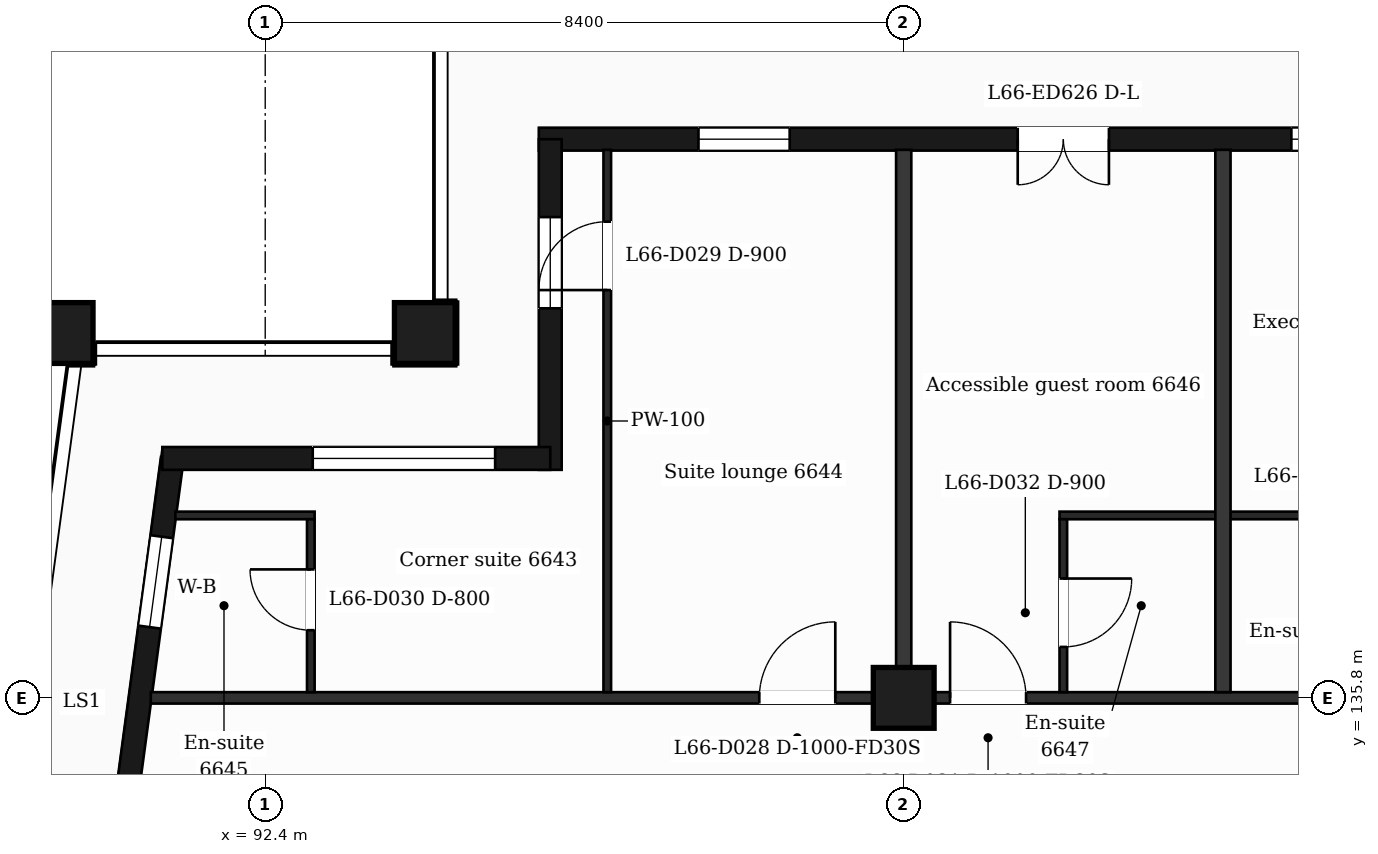
"""IFC4 building model, lengths in metres.
Left out: names, types, materials, properties, quantities, classifications, styles, units other than length and angle.
Written with IfcOpenShell. Run it as: python <this file> out.ifc"""

import sys

from ifc_helpers import new_model, si_unit, direction, frame, frame_2d, origin, origin_2d, place, context, subcontext, project, spatial, rectangle, extrude, element, fill, save


model = new_model("IFC4")
c1 = context("Model", 3, precision=1e-05, world=origin(), true_north=direction((0.0, 1.0)))
c2 = subcontext(c1, "Body", "Model", "MODEL_VIEW")
j1 = project(units=[si_unit("LENGTHUNIT", "METRE"), si_unit("PLANEANGLEUNIT", "RADIAN")], contexts=[c1])
p1 = place(None, origin())
s1 = spatial("IfcSite", under=j1, at=p1, CompositionType="ELEMENT")
p2 = place(p1, origin())
s2 = spatial("IfcBuilding", under=s1, at=p2, CompositionType="ELEMENT")
p3 = place(p2, frame((0.0, 0.0, 273.8)))
s3 = spatial("IfcBuildingStorey", under=s2, at=p3, CompositionType="ELEMENT", Elevation=273.8)
for number, where, z_axis, x_axis in (
    (1, (94.5, 140.6, 0.0), (0.0, 0.0, 1.0), (1.0, 0.0, 0.0)),
    (2, (89.735, 140.6, 0.0), (0.0, 0.0, 1.0), (1.0, 0.0, 0.0)),
    (3, (100.8, 135.8, 0.0), (0.0, 0.0, 1.0), (1.0, 0.0, 0.0)),
):
    element("IfcColumn", number, at=place(p3, frame(where, z_axis=z_axis, x_axis=x_axis)), inside=s3, PredefinedType="COLUMN", context=c2, shape_type="SweptSolid", body=[
        extrude(rectangle(XDim=0.8, YDim=0.8, at=origin_2d()), origin(), (0.0, 0.0, 1.0), 3.7),
    ])
p4 = place(p3, frame((91.177, 138.95, 0.0), z_axis=(0.0, 0.0, 1.0), x_axis=(-0.133426664613, -0.991058689065, 0.0)))
e4 = element("IfcWall", 4, at=p4, inside=s3, PredefinedType="SOLIDWALL", context=c2, shape_type="SweptSolid", body=[
    extrude(rectangle(XDim=6.609, YDim=0.3, at=frame_2d((3.305, 0.0))), origin(), (0.0, 0.0, 1.0), 3.38),
])
p5 = place(p4, frame((1.039, 0.0, 0.9)))
e5 = element("IfcOpeningElement", 5, at=p5, cuts=e4, PredefinedType="OPENING", context=c2, shape_type="SweptSolid", body=[
    extrude(rectangle(XDim=1.2, YDim=2.1, at=frame_2d((0.6, 1.05))), frame((0.0, 0.16, 0.0), z_axis=(0.0, -1.0, 0.0), x_axis=(1.0, 0.0, 0.0)), (0.0, 0.0, 1.0), 0.32),
])
p6 = place(p4, frame((4.294, 0.0, 0.0)))
e6 = element("IfcOpeningElement", 6, at=p6, cuts=e4, PredefinedType="OPENING", context=c2, shape_type="SweptSolid", body=[
    extrude(rectangle(XDim=1.2, YDim=2.4, at=frame_2d((0.6, 1.2))), frame((0.0, 0.16, 0.0), z_axis=(0.0, -1.0, 0.0), x_axis=(1.0, 0.0, 0.0)), (0.0, 0.0, 1.0), 0.32),
])
p7 = place(p3, frame((110.4, 143.15, 0.0), z_axis=(0.0, 0.0, 1.0), x_axis=(-1.0, 0.0, 0.0)))
e7 = element("IfcWall", 7, at=p7, inside=s3, PredefinedType="SOLIDWALL", context=c2, shape_type="SweptSolid", body=[
    extrude(rectangle(XDim=14.4, YDim=0.3, at=frame_2d((7.2, 0.0))), origin(), (0.0, 0.0, 1.0), 3.38),
])
p8 = place(p7, frame((2.1, 0.0, 0.9)))
e8 = element("IfcOpeningElement", 8, at=p8, cuts=e7, PredefinedType="OPENING", context=c2, shape_type="SweptSolid", body=[
    extrude(rectangle(XDim=2.4, YDim=2.1, at=frame_2d((1.2, 1.05))), frame((0.0, 0.16, 0.0), z_axis=(0.0, -1.0, 0.0), x_axis=(1.0, 0.0, 0.0)), (0.0, 0.0, 1.0), 0.32),
])
p9 = place(p7, frame((6.9, 0.0, 0.0)))
e9 = element("IfcOpeningElement", 9, at=p9, cuts=e7, PredefinedType="OPENING", context=c2, shape_type="SweptSolid", body=[
    extrude(rectangle(XDim=1.2, YDim=2.4, at=frame_2d((0.6, 1.2))), frame((0.0, 0.16, 0.0), z_axis=(0.0, -1.0, 0.0), x_axis=(1.0, 0.0, 0.0)), (0.0, 0.0, 1.0), 0.32),
])
p10 = place(p7, frame((11.1, 0.0, 0.9)))
e10 = element("IfcOpeningElement", 10, at=p10, cuts=e7, PredefinedType="OPENING", context=c2, shape_type="SweptSolid", body=[
    extrude(rectangle(XDim=1.2, YDim=2.1, at=frame_2d((0.6, 1.05))), frame((0.0, 0.16, 0.0), z_axis=(0.0, -1.0, 0.0), x_axis=(1.0, 0.0, 0.0)), (0.0, 0.0, 1.0), 0.32),
])
p11 = place(p3, frame((96.15, 143.15, 0.0), z_axis=(0.0, 0.0, 1.0), x_axis=(0.0, -1.0, 0.0)))
e11 = element("IfcWall", 11, at=p11, inside=s3, PredefinedType="SOLIDWALL", context=c2, shape_type="SweptSolid", body=[
    extrude(rectangle(XDim=4.35, YDim=0.3, at=frame_2d((2.175, 0.0))), origin(), (0.0, 0.0, 1.0), 3.38),
])
p12 = place(p11, frame((1.025, 0.0, 0.9)))
e12 = element("IfcOpeningElement", 12, at=p12, cuts=e11, PredefinedType="OPENING", context=c2, shape_type="SweptSolid", body=[
    extrude(rectangle(XDim=1.2, YDim=2.1, at=frame_2d((0.6, 1.05))), frame((0.0, 0.16, 0.0), z_axis=(0.0, -1.0, 0.0), x_axis=(1.0, 0.0, 0.0)), (0.0, 0.0, 1.0), 0.32),
])
p13 = place(p3, frame((96.15, 138.95, 0.0), z_axis=(0.0, 0.0, 1.0), x_axis=(-1.0, 0.0, 0.0)))
e13 = element("IfcWall", 13, at=p13, inside=s3, PredefinedType="SOLIDWALL", context=c2, shape_type="SweptSolid", body=[
    extrude(rectangle(XDim=5.104, YDim=0.3, at=frame_2d((2.552, 0.0))), origin(), (0.0, 0.0, 1.0), 3.38),
])
p14 = place(p13, frame((0.725, 0.0, 0.9)))
e14 = element("IfcOpeningElement", 14, at=p14, cuts=e13, PredefinedType="OPENING", context=c2, shape_type="SweptSolid", body=[
    extrude(rectangle(XDim=2.4, YDim=2.1, at=frame_2d((1.2, 1.05))), frame((0.0, 0.16, 0.0), z_axis=(0.0, -1.0, 0.0), x_axis=(1.0, 0.0, 0.0)), (0.0, 0.0, 1.0), 0.32),
])
p15 = place(p3, frame((90.895, 135.8, 0.0), z_axis=(0.0, 0.0, 1.0), x_axis=(1.0, 0.0, 0.0)))
e15 = element("IfcWall", 15, at=p15, inside=s3, PredefinedType="PARTITIONING", context=c2, shape_type="SweptSolid", body=[
    extrude(rectangle(XDim=45.011, YDim=0.15, at=frame_2d((22.505, 0.0))), origin(), (0.0, 0.0, 1.0), 3.38),
])
p16 = place(p15, frame((8.005, 0.0, 0.0)))
e16 = element("IfcOpeningElement", 16, at=p16, cuts=e15, PredefinedType="OPENING", context=c2, shape_type="SweptSolid", body=[
    extrude(rectangle(XDim=1.0, YDim=2.1, at=frame_2d((0.5, 1.05))), frame((0.0, 0.085, 0.0), z_axis=(0.0, -1.0, 0.0), x_axis=(1.0, 0.0, 0.0)), (0.0, 0.0, 1.0), 0.17),
])
p17 = place(p15, frame((10.515, 0.0, 0.0)))
e17 = element("IfcOpeningElement", 17, at=p17, cuts=e15, PredefinedType="OPENING", context=c2, shape_type="SweptSolid", body=[
    extrude(rectangle(XDim=1.0, YDim=2.1, at=frame_2d((0.5, 1.05))), frame((0.0, 0.085, 0.0), z_axis=(0.0, -1.0, 0.0), x_axis=(1.0, 0.0, 0.0)), (0.0, 0.0, 1.0), 0.17),
])
p18 = place(p15, frame((20.156, 0.0, 0.0)))
e18 = element("IfcOpeningElement", 18, at=p18, cuts=e15, PredefinedType="OPENING", context=c2, shape_type="SweptSolid", body=[
    extrude(rectangle(XDim=1.0, YDim=2.1, at=frame_2d((0.5, 1.05))), frame((0.0, 0.085, 0.0), z_axis=(0.0, -1.0, 0.0), x_axis=(1.0, 0.0, 0.0)), (0.0, 0.0, 1.0), 0.17),
])
p19 = place(p15, frame((24.13, 0.0, 0.0)))
e19 = element("IfcOpeningElement", 19, at=p19, cuts=e15, PredefinedType="OPENING", context=c2, shape_type="SweptSolid", body=[
    extrude(rectangle(XDim=0.95, YDim=2.1, at=frame_2d((0.475, 1.05))), frame((0.0, 0.085, 0.0), z_axis=(0.0, -1.0, 0.0), x_axis=(1.0, 0.0, 0.0)), (0.0, 0.0, 1.0), 0.17),
])
p20 = place(p15, frame((29.492, 0.0, 0.0)))
e20 = element("IfcOpeningElement", 20, at=p20, cuts=e15, PredefinedType="OPENING", context=c2, shape_type="SweptSolid", body=[
    extrude(rectangle(XDim=0.95, YDim=2.1, at=frame_2d((0.475, 1.05))), frame((0.0, 0.085, 0.0), z_axis=(0.0, -1.0, 0.0), x_axis=(1.0, 0.0, 0.0)), (0.0, 0.0, 1.0), 0.17),
])
p21 = place(p15, frame((31.705, 0.0, 0.0)))
e21 = element("IfcOpeningElement", 21, at=p21, cuts=e15, PredefinedType="OPENING", context=c2, shape_type="SweptSolid", body=[
    extrude(rectangle(XDim=0.95, YDim=2.1, at=frame_2d((0.475, 1.05))), frame((0.0, 0.085, 0.0), z_axis=(0.0, -1.0, 0.0), x_axis=(1.0, 0.0, 0.0)), (0.0, 0.0, 1.0), 0.17),
])
p22 = place(p15, frame((39.814, 0.0, 0.0)))
e22 = element("IfcOpeningElement", 22, at=p22, cuts=e15, PredefinedType="OPENING", context=c2, shape_type="SweptSolid", body=[
    extrude(rectangle(XDim=0.95, YDim=2.1, at=frame_2d((0.475, 1.05))), frame((0.0, 0.085, 0.0), z_axis=(0.0, -1.0, 0.0), x_axis=(1.0, 0.0, 0.0)), (0.0, 0.0, 1.0), 0.17),
])
p23 = place(p3, frame((91.218, 138.2, 0.0), z_axis=(0.0, 0.0, 1.0), x_axis=(1.0, 0.0, 0.0)))
e23 = element("IfcWall", 23, at=p23, inside=s3, PredefinedType="PARTITIONING", context=c2, shape_type="SweptSolid", body=[
    extrude(rectangle(XDim=1.832, YDim=0.1, at=frame_2d((0.916, 0.0))), origin(), (0.0, 0.0, 1.0), 3.38),
])
p24 = place(p3, frame((102.85, 138.2, 0.0), z_axis=(0.0, 0.0, 1.0), x_axis=(1.0, 0.0, 0.0)))
e24 = element("IfcWall", 24, at=p24, inside=s3, PredefinedType="PARTITIONING", context=c2, shape_type="SweptSolid", body=[
    extrude(rectangle(XDim=4.9, YDim=0.1, at=frame_2d((2.45, 0.0))), origin(), (0.0, 0.0, 1.0), 3.38),
])
p25 = place(p24, frame((3.22, 0.0, 0.0)))
e25 = element("IfcOpeningElement", 25, at=p25, cuts=e24, PredefinedType="OPENING", context=c2, shape_type="SweptSolid", body=[
    extrude(rectangle(XDim=0.8, YDim=2.1, at=frame_2d((0.4, 1.05))), frame((0.0, 0.06, 0.0), z_axis=(0.0, -1.0, 0.0), x_axis=(1.0, 0.0, 0.0)), (0.0, 0.0, 1.0), 0.12),
])
p26 = place(p3, frame((93.0, 135.875, 0.0), z_axis=(0.0, 0.0, 1.0), x_axis=(0.0, 1.0, 0.0)))
e26 = element("IfcWall", 26, at=p26, inside=s3, PredefinedType="PARTITIONING", context=c2, shape_type="SweptSolid", body=[
    extrude(rectangle(XDim=2.275, YDim=0.1, at=frame_2d((1.137, 0.0))), origin(), (0.0, 0.0, 1.0), 3.38),
])
p27 = place(p26, frame((0.815, 0.0, 0.0)))
e27 = element("IfcOpeningElement", 27, at=p27, cuts=e26, PredefinedType="OPENING", context=c2, shape_type="SweptSolid", body=[
    extrude(rectangle(XDim=0.8, YDim=2.1, at=frame_2d((0.4, 1.05))), frame((0.0, 0.06, 0.0), z_axis=(0.0, -1.0, 0.0), x_axis=(1.0, 0.0, 0.0)), (0.0, 0.0, 1.0), 0.12),
])
p28 = place(p3, frame((96.9, 135.875, 0.0), z_axis=(0.0, 0.0, 1.0), x_axis=(0.0, 1.0, 0.0)))
e28 = element("IfcWall", 28, at=p28, inside=s3, PredefinedType="PARTITIONING", context=c2, shape_type="SweptSolid", body=[
    extrude(rectangle(XDim=7.135, YDim=0.1, at=frame_2d((3.567, 0.0))), origin(), (0.0, 0.0, 1.0), 3.38),
])
p29 = place(p28, frame((5.29, 0.0, 0.0)))
e29 = element("IfcOpeningElement", 29, at=p29, cuts=e28, PredefinedType="OPENING", context=c2, shape_type="SweptSolid", body=[
    extrude(rectangle(XDim=0.9, YDim=2.1, at=frame_2d((0.45, 1.05))), frame((0.0, 0.06, 0.0), z_axis=(0.0, -1.0, 0.0), x_axis=(1.0, 0.0, 0.0)), (0.0, 0.0, 1.0), 0.12),
])
p30 = place(p3, frame((100.8, 135.875, 0.0), z_axis=(0.0, 0.0, 1.0), x_axis=(0.0, 1.0, 0.0)))
e30 = element("IfcWall", 30, at=p30, inside=s3, PredefinedType="PARTITIONING", context=c2, shape_type="SweptSolid", body=[
    extrude(rectangle(XDim=7.135, YDim=0.2, at=frame_2d((3.567, 0.0))), origin(), (0.0, 0.0, 1.0), 3.38),
])
p31 = place(p3, frame((102.9, 135.875, 0.0), z_axis=(0.0, 0.0, 1.0), x_axis=(0.0, 1.0, 0.0)))
e31 = element("IfcWall", 31, at=p31, inside=s3, PredefinedType="PARTITIONING", context=c2, shape_type="SweptSolid", body=[
    extrude(rectangle(XDim=2.275, YDim=0.1, at=frame_2d((1.137, 0.0))), origin(), (0.0, 0.0, 1.0), 3.38),
])
p32 = place(p31, frame((0.595, 0.0, 0.0)))
e32 = element("IfcOpeningElement", 32, at=p32, cuts=e31, PredefinedType="OPENING", context=c2, shape_type="SweptSolid", body=[
    extrude(rectangle(XDim=0.9, YDim=2.1, at=frame_2d((0.45, 1.05))), frame((0.0, 0.06, 0.0), z_axis=(0.0, -1.0, 0.0), x_axis=(1.0, 0.0, 0.0)), (0.0, 0.0, 1.0), 0.12),
])
p33 = place(p3, frame((105.0, 135.875, 0.0), z_axis=(0.0, 0.0, 1.0), x_axis=(0.0, 1.0, 0.0)))
e33 = element("IfcWall", 33, at=p33, inside=s3, PredefinedType="PARTITIONING", context=c2, shape_type="SweptSolid", body=[
    extrude(rectangle(XDim=7.135, YDim=0.2, at=frame_2d((3.567, 0.0))), origin(), (0.0, 0.0, 1.0), 3.38),
])
p34 = place(p5, origin())
e34 = element("IfcWindow", 34, at=p34, inside=s3, PartitioningType="SINGLE_PANEL", PredefinedType="WINDOW", context=c2, shape_type="SweptSolid", body=[
    extrude(rectangle(XDim=1.2, YDim=2.1, at=frame_2d((0.6, 1.05))), frame((0.0, 0.03, 0.0), z_axis=(0.0, -1.0, 0.0), x_axis=(1.0, 0.0, 0.0)), (0.0, 0.0, 1.0), 0.06),
])
fill(e5, e34)
p35 = place(p8, origin())
e35 = element("IfcWindow", 35, at=p35, inside=s3, PartitioningType="SINGLE_PANEL", PredefinedType="WINDOW", context=c2, shape_type="SweptSolid", body=[
    extrude(rectangle(XDim=2.4, YDim=2.1, at=frame_2d((1.2, 1.05))), frame((0.0, 0.03, 0.0), z_axis=(0.0, -1.0, 0.0), x_axis=(1.0, 0.0, 0.0)), (0.0, 0.0, 1.0), 0.06),
])
fill(e8, e35)
p36 = place(p9, origin())
e36 = element("IfcDoor", 36, at=p36, inside=s3, OperationType="DOUBLE_DOOR_SINGLE_SWING", PredefinedType="DOOR", context=c2, shape_type="SweptSolid", body=[
    extrude(rectangle(XDim=1.2, YDim=2.4, at=frame_2d((0.6, 1.2))), frame((0.0, 0.025, 0.0), z_axis=(0.0, -1.0, 0.0), x_axis=(1.0, 0.0, 0.0)), (0.0, 0.0, 1.0), 0.05),
])
fill(e9, e36)
p37 = place(p10, origin())
e37 = element("IfcWindow", 37, at=p37, inside=s3, PartitioningType="SINGLE_PANEL", PredefinedType="WINDOW", context=c2, shape_type="SweptSolid", body=[
    extrude(rectangle(XDim=1.2, YDim=2.1, at=frame_2d((0.6, 1.05))), frame((0.0, 0.03, 0.0), z_axis=(0.0, -1.0, 0.0), x_axis=(1.0, 0.0, 0.0)), (0.0, 0.0, 1.0), 0.06),
])
fill(e10, e37)
p38 = place(p12, origin())
e38 = element("IfcWindow", 38, at=p38, inside=s3, PartitioningType="SINGLE_PANEL", PredefinedType="WINDOW", context=c2, shape_type="SweptSolid", body=[
    extrude(rectangle(XDim=1.2, YDim=2.1, at=frame_2d((0.6, 1.05))), frame((0.0, 0.03, 0.0), z_axis=(0.0, -1.0, 0.0), x_axis=(1.0, 0.0, 0.0)), (0.0, 0.0, 1.0), 0.06),
])
fill(e12, e38)
p39 = place(p14, origin())
e39 = element("IfcWindow", 39, at=p39, inside=s3, PartitioningType="SINGLE_PANEL", PredefinedType="WINDOW", context=c2, shape_type="SweptSolid", body=[
    extrude(rectangle(XDim=2.4, YDim=2.1, at=frame_2d((1.2, 1.05))), frame((0.0, 0.03, 0.0), z_axis=(0.0, -1.0, 0.0), x_axis=(1.0, 0.0, 0.0)), (0.0, 0.0, 1.0), 0.06),
])
fill(e14, e39)
p40 = place(p16, origin())
e40 = element("IfcDoor", 40, at=p40, inside=s3, OperationType="SINGLE_SWING_RIGHT", PredefinedType="DOOR", context=c2, shape_type="SweptSolid", body=[
    extrude(rectangle(XDim=1.0, YDim=2.1, at=frame_2d((0.5, 1.05))), frame((0.0, 0.025, 0.0), z_axis=(0.0, -1.0, 0.0), x_axis=(1.0, 0.0, 0.0)), (0.0, 0.0, 1.0), 0.05),
])
fill(e16, e40)
p41 = place(p29, origin())
e41 = element("IfcDoor", 41, at=p41, inside=s3, OperationType="SINGLE_SWING_LEFT", PredefinedType="DOOR", context=c2, shape_type="SweptSolid", body=[
    extrude(rectangle(XDim=0.9, YDim=2.1, at=frame_2d((0.45, 1.05))), frame((0.0, 0.025, 0.0), z_axis=(0.0, -1.0, 0.0), x_axis=(1.0, 0.0, 0.0)), (0.0, 0.0, 1.0), 0.05),
])
fill(e29, e41)
p42 = place(p27, origin())
e42 = element("IfcDoor", 42, at=p42, inside=s3, OperationType="SINGLE_SWING_RIGHT", PredefinedType="DOOR", context=c2, shape_type="SweptSolid", body=[
    extrude(rectangle(XDim=0.8, YDim=2.1, at=frame_2d((0.4, 1.05))), frame((0.0, 0.025, 0.0), z_axis=(0.0, -1.0, 0.0), x_axis=(1.0, 0.0, 0.0)), (0.0, 0.0, 1.0), 0.05),
])
fill(e27, e42)
p43 = place(p17, origin())
e43 = element("IfcDoor", 43, at=p43, inside=s3, OperationType="SINGLE_SWING_LEFT", PredefinedType="DOOR", context=c2, shape_type="SweptSolid", body=[
    extrude(rectangle(XDim=1.0, YDim=2.1, at=frame_2d((0.5, 1.05))), frame((0.0, 0.025, 0.0), z_axis=(0.0, -1.0, 0.0), x_axis=(1.0, 0.0, 0.0)), (0.0, 0.0, 1.0), 0.05),
])
fill(e17, e43)
p44 = place(p32, origin())
e44 = element("IfcDoor", 44, at=p44, inside=s3, OperationType="SINGLE_SWING_RIGHT", PredefinedType="DOOR", context=c2, shape_type="SweptSolid", body=[
    extrude(rectangle(XDim=0.9, YDim=2.1, at=frame_2d((0.45, 1.05))), frame((0.0, 0.025, 0.0), z_axis=(0.0, -1.0, 0.0), x_axis=(1.0, 0.0, 0.0)), (0.0, 0.0, 1.0), 0.05),
])
fill(e32, e44)
save(model, sys.argv[1])
